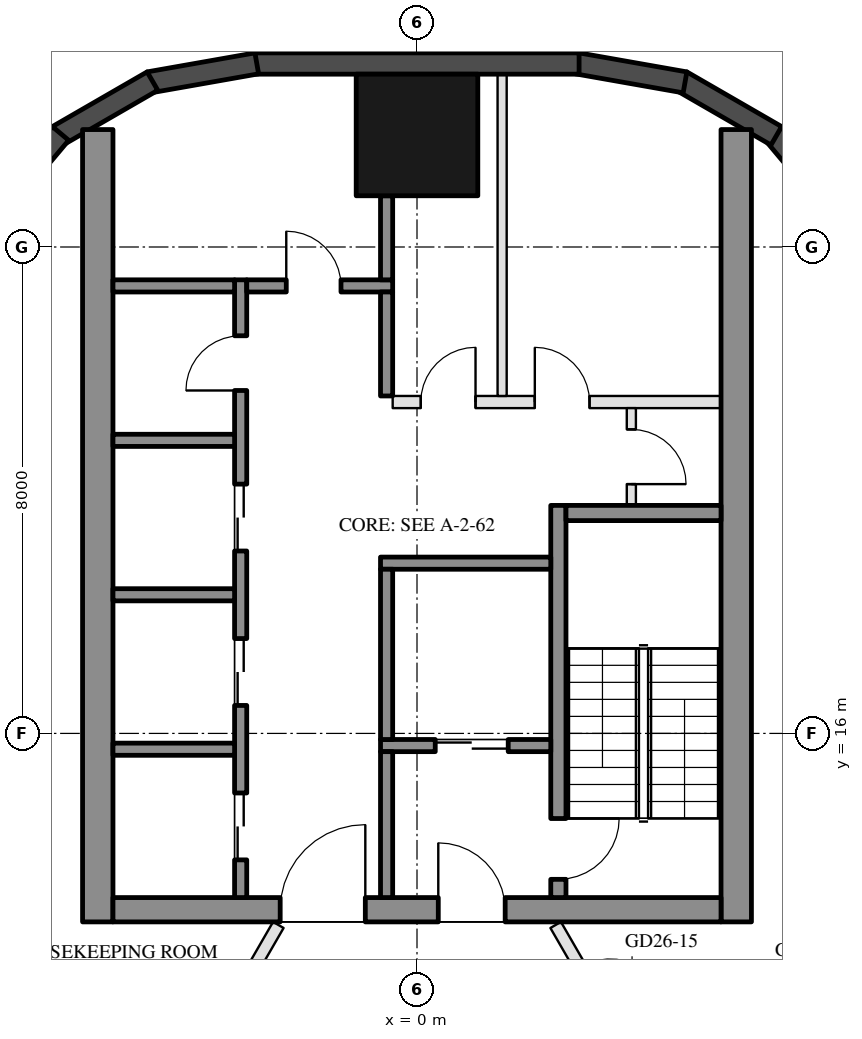
"""IFC4 building model, lengths in metres.
Left out: names, types, materials, properties, quantities, classifications, styles, units other than length and angle.
Written with IfcOpenShell. Run it as: python <this file> out.ifc"""

import sys

from ifc_helpers import new_model, si_unit, direction, frame, frame_2d, origin, origin_2d, place, context, subcontext, project, spatial, rectangle, hollow_rectangle, extrude, boolean, halfspace, element, fill, save


model = new_model("IFC4")
c1 = context("Model", 3, precision=1e-05, world=origin(), true_north=direction((0.0, 1.0)))
c2 = subcontext(c1, "Body", "Model", "MODEL_VIEW")
j1 = project(units=[si_unit("LENGTHUNIT", "METRE"), si_unit("PLANEANGLEUNIT", "RADIAN")], contexts=[c1])
p1 = place(None, origin())
s1 = spatial("IfcSite", under=j1, at=p1, CompositionType="ELEMENT")
p2 = place(p1, origin())
s2 = spatial("IfcBuilding", under=s1, at=p2, CompositionType="ELEMENT")
p3 = place(p2, frame((0.0, 0.0, 268.9)))
s3 = spatial("IfcBuildingStorey", under=s2, at=p3, CompositionType="ELEMENT", Elevation=268.9)
p4 = place(p3, frame((0.0, 25.843, 0.0), z_axis=(0.0, 0.0, 1.0), x_axis=(1.0, 0.0, 0.0)))
e1 = element("IfcColumn", 1, at=p4, inside=s3, PredefinedType="COLUMN", context=c2, shape_type="SweptSolid", body=[
    boolean("DIFFERENCE", extrude(hollow_rectangle(XDim=2.0, YDim=2.0, WallThickness=0.05, at=origin_2d()), origin(), (0.0, 0.0, 1.0), 3.7), halfspace(frame((0.0, 0.0, 0.113), z_axis=(0.0, 0.0, 1.0), x_axis=(1.0, 0.0, 0.0)), True)),
])
p5 = place(p3, frame((7.019, 24.489, 0.0), z_axis=(0.0, 0.0, 1.0), x_axis=(-0.642756114672, 0.766070869471, 0.0)))
e2 = element("IfcWall", 2, at=p5, inside=s3, PredefinedType="SOLIDWALL", context=c2, shape_type="SweptSolid", body=[
    extrude(rectangle(XDim=1.8, YDim=0.35, at=frame_2d((0.9, 0.0))), origin(), (0.0, 0.0, 1.0), 3.55),
])
for number, where, z_axis, x_axis in (
    (3, (5.909, 25.829, 0.0), (0.0, 0.0, 1.0), (-0.866, 0.5, 0.0)),
    (4, (4.408, 26.708, 0.0), (0.0, 0.0, 1.0), (-0.985, 0.174, 0.0)),
):
    element("IfcWall", number, at=place(p3, frame(where, z_axis=z_axis, x_axis=x_axis)), inside=s3, PredefinedType="SOLIDWALL", context=c2, shape_type="SweptSolid", body=[
        extrude(rectangle(XDim=1.8, YDim=0.35, at=frame_2d((0.9, 0.0))), origin(), (0.0, 0.0, 1.0), 3.55),
    ])
p6 = place(p3, frame((2.666, 27.018, 0.0), z_axis=(0.0, 0.0, 1.0), x_axis=(-1.0, 0.0, 0.0)))
e5 = element("IfcWall", 5, at=p6, inside=s3, PredefinedType="SOLIDWALL", context=c2, shape_type="SweptSolid", body=[
    extrude(rectangle(XDim=5.331, YDim=0.35, at=frame_2d((2.666, 0.0))), origin(), (0.0, 0.0, 1.0), 3.55),
])
for number, where, z_axis, x_axis in (
    (6, (-2.635, 27.02, 0.0), (0.0, 0.0, 1.0), (-0.985, -0.174, 0.0)),
    (7, (-4.351, 26.729, 0.0), (0.0, 0.0, 1.0), (-0.866, -0.5, 0.0)),
):
    element("IfcWall", number, at=place(p3, frame(where, z_axis=z_axis, x_axis=x_axis)), inside=s3, PredefinedType="SOLIDWALL", context=c2, shape_type="SweptSolid", body=[
        extrude(rectangle(XDim=1.8, YDim=0.35, at=frame_2d((0.9, 0.0))), origin(), (0.0, 0.0, 1.0), 3.55),
    ])
p7 = place(p3, frame((-5.863, 25.868, 0.0), z_axis=(0.0, 0.0, 1.0), x_axis=(-0.642756114672, -0.766070869471, 0.0)))
e8 = element("IfcWall", 8, at=p7, inside=s3, PredefinedType="SOLIDWALL", context=c2, shape_type="SweptSolid", body=[
    extrude(rectangle(XDim=1.8, YDim=0.35, at=frame_2d((0.9, 0.0))), origin(), (0.0, 0.0, 1.0), 3.55),
])
for number, where, z_axis, x_axis in (
    (9, (5.25, 12.9, 0.0), (0.0, 0.0, 1.0), (0.0, 1.0, 0.0)),
    (10, (-5.25, 12.9, 0.0), (0.0, 0.0, 1.0), (0.0, 1.0, 0.0)),
):
    element("IfcWall", number, at=place(p3, frame(where, z_axis=z_axis, x_axis=x_axis)), inside=s3, PredefinedType="SHEAR", context=c2, shape_type="SweptSolid", body=[
        extrude(rectangle(XDim=13.031, YDim=0.5, at=frame_2d((6.516, 0.0))), origin(), (0.0, 0.0, 1.0), 3.5),
    ])
p8 = place(p3, frame((5.0, 13.1, 0.0), z_axis=(0.0, 0.0, 1.0), x_axis=(-1.0, 0.0, 0.0)))
e11 = element("IfcWall", 11, at=p8, inside=s3, PredefinedType="SHEAR", context=c2, shape_type="SweptSolid", body=[
    extrude(rectangle(XDim=10.0, YDim=0.4, at=frame_2d((5.0, 0.0))), origin(), (0.0, 0.0, 1.0), 3.5),
])
p9 = place(p8, frame((3.55, 0.0, 0.0)))
e12 = element("IfcOpeningElement", 12, at=p9, cuts=e11, PredefinedType="OPENING", context=c2, shape_type="SweptSolid", body=[
    extrude(rectangle(XDim=1.1, YDim=2.1, at=frame_2d((0.55, 1.05))), frame((0.0, 0.21, 0.0), z_axis=(0.0, -1.0, 0.0), x_axis=(1.0, 0.0, 0.0)), (0.0, 0.0, 1.0), 0.42),
])
p10 = place(p8, frame((5.85, 0.0, 0.0)))
e13 = element("IfcOpeningElement", 13, at=p10, cuts=e11, PredefinedType="OPENING", context=c2, shape_type="SweptSolid", body=[
    extrude(rectangle(XDim=1.4, YDim=2.1, at=frame_2d((0.7, 1.05))), frame((0.0, 0.21, 0.0), z_axis=(0.0, -1.0, 0.0), x_axis=(1.0, 0.0, 0.0)), (0.0, 0.0, 1.0), 0.42),
])
p11 = place(p3, frame((2.325, 13.3, 0.0), z_axis=(0.0, 0.0, 1.0), x_axis=(0.0, 1.0, 0.0)))
e14 = element("IfcWall", 14, at=p11, inside=s3, PredefinedType="SHEAR", context=c2, shape_type="SweptSolid", body=[
    extrude(rectangle(XDim=6.45, YDim=0.25, at=frame_2d((3.225, 0.0))), origin(), (0.0, 0.0, 1.0), 3.5),
])
p12 = place(p11, frame((0.3, 0.0, 0.0)))
e15 = element("IfcOpeningElement", 15, at=p12, cuts=e14, PredefinedType="OPENING", context=c2, shape_type="SweptSolid", body=[
    extrude(rectangle(XDim=1.0, YDim=2.1, at=frame_2d((0.5, 1.05))), frame((0.0, 0.135, 0.0), z_axis=(0.0, -1.0, 0.0), x_axis=(1.0, 0.0, 0.0)), (0.0, 0.0, 1.0), 0.27),
])
p13 = place(p3, frame((5.0, 19.625, 0.0), z_axis=(0.0, 0.0, 1.0), x_axis=(-1.0, 0.0, 0.0)))
e16 = element("IfcWall", 16, at=p13, inside=s3, PredefinedType="SHEAR", context=c2, shape_type="SweptSolid", body=[
    extrude(rectangle(XDim=2.55, YDim=0.25, at=frame_2d((1.275, 0.0))), origin(), (0.0, 0.0, 1.0), 3.5),
])
p14 = place(p3, frame((2.2, 18.8, 0.0), z_axis=(0.0, 0.0, 1.0), x_axis=(-1.0, 0.0, 0.0)))
e17 = element("IfcWall", 17, at=p14, inside=s3, PredefinedType="SHEAR", context=c2, shape_type="SweptSolid", body=[
    extrude(rectangle(XDim=2.8, YDim=0.2, at=frame_2d((1.4, 0.0))), origin(), (0.0, 0.0, 1.0), 3.5),
])
p15 = place(p3, frame((2.2, 15.8, 0.0), z_axis=(0.0, 0.0, 1.0), x_axis=(-1.0, 0.0, 0.0)))
e18 = element("IfcWall", 18, at=p15, inside=s3, PredefinedType="SHEAR", context=c2, shape_type="SweptSolid", body=[
    extrude(rectangle(XDim=2.8, YDim=0.2, at=frame_2d((1.4, 0.0))), origin(), (0.0, 0.0, 1.0), 3.5),
])
p16 = place(p15, frame((0.7, 0.0, 0.0)))
e19 = element("IfcOpeningElement", 19, at=p16, cuts=e18, PredefinedType="OPENING", context=c2, shape_type="SweptSolid", body=[
    extrude(rectangle(XDim=1.2, YDim=2.1, at=frame_2d((0.6, 1.05))), frame((0.0, 0.11, 0.0), z_axis=(0.0, -1.0, 0.0), x_axis=(1.0, 0.0, 0.0)), (0.0, 0.0, 1.0), 0.22),
])
p17 = place(p3, frame((-0.5, 15.9, 0.0), z_axis=(0.0, 0.0, 1.0), x_axis=(0.0, 1.0, 0.0)))
e20 = element("IfcWall", 20, at=p17, inside=s3, PredefinedType="SHEAR", context=c2, shape_type="SweptSolid", body=[
    extrude(rectangle(XDim=2.8, YDim=0.2, at=frame_2d((1.4, 0.0))), origin(), (0.0, 0.0, 1.0), 3.5),
])
p18 = place(p3, frame((-0.5, 13.3, 0.0), z_axis=(0.0, 0.0, 1.0), x_axis=(0.0, 1.0, 0.0)))
e21 = element("IfcWall", 21, at=p18, inside=s3, PredefinedType="SHEAR", context=c2, shape_type="SweptSolid", body=[
    extrude(rectangle(XDim=2.4, YDim=0.2, at=frame_2d((1.2, 0.0))), origin(), (0.0, 0.0, 1.0), 3.5),
])
p19 = place(p3, frame((-2.9, 13.3, 0.0), z_axis=(0.0, 0.0, 1.0), x_axis=(0.0, 1.0, 0.0)))
e22 = element("IfcWall", 22, at=p19, inside=s3, PredefinedType="SHEAR", context=c2, shape_type="SweptSolid", body=[
    extrude(rectangle(XDim=10.16, YDim=0.2, at=frame_2d((5.08, 0.0))), origin(), (0.0, 0.0, 1.0), 3.5),
])
p20 = place(p19, frame((0.62, 0.0, 0.0)))
e23 = element("IfcOpeningElement", 23, at=p20, cuts=e22, PredefinedType="OPENING", context=c2, shape_type="SweptSolid", body=[
    extrude(rectangle(XDim=1.1, YDim=2.1, at=frame_2d((0.55, 1.05))), frame((0.0, 0.11, 0.0), z_axis=(0.0, -1.0, 0.0), x_axis=(1.0, 0.0, 0.0)), (0.0, 0.0, 1.0), 0.22),
])
p21 = place(p19, frame((3.16, 0.0, 0.0)))
e24 = element("IfcOpeningElement", 24, at=p21, cuts=e22, PredefinedType="OPENING", context=c2, shape_type="SweptSolid", body=[
    extrude(rectangle(XDim=1.1, YDim=2.1, at=frame_2d((0.55, 1.05))), frame((0.0, 0.11, 0.0), z_axis=(0.0, -1.0, 0.0), x_axis=(1.0, 0.0, 0.0)), (0.0, 0.0, 1.0), 0.22),
])
p22 = place(p19, frame((5.7, 0.0, 0.0)))
e25 = element("IfcOpeningElement", 25, at=p22, cuts=e22, PredefinedType="OPENING", context=c2, shape_type="SweptSolid", body=[
    extrude(rectangle(XDim=1.1, YDim=2.1, at=frame_2d((0.55, 1.05))), frame((0.0, 0.11, 0.0), z_axis=(0.0, -1.0, 0.0), x_axis=(1.0, 0.0, 0.0)), (0.0, 0.0, 1.0), 0.22),
])
p23 = place(p19, frame((8.34, 0.0, 0.0)))
e26 = element("IfcOpeningElement", 26, at=p23, cuts=e22, PredefinedType="OPENING", context=c2, shape_type="SweptSolid", body=[
    extrude(rectangle(XDim=0.9, YDim=2.1, at=frame_2d((0.45, 1.05))), frame((0.0, 0.11, 0.0), z_axis=(0.0, -1.0, 0.0), x_axis=(1.0, 0.0, 0.0)), (0.0, 0.0, 1.0), 0.22),
])
p24 = place(p3, frame((-0.4, 23.36, 0.0), z_axis=(0.0, 0.0, 1.0), x_axis=(-1.0, 0.0, 0.0)))
e27 = element("IfcWall", 27, at=p24, inside=s3, PredefinedType="SHEAR", context=c2, shape_type="SweptSolid", body=[
    extrude(rectangle(XDim=2.4, YDim=0.2, at=frame_2d((1.2, 0.0))), origin(), (0.0, 0.0, 1.0), 3.5),
])
p25 = place(p24, frame((0.85, 0.0, 0.0)))
e28 = element("IfcOpeningElement", 28, at=p25, cuts=e27, PredefinedType="OPENING", context=c2, shape_type="SweptSolid", body=[
    extrude(rectangle(XDim=0.9, YDim=2.1, at=frame_2d((0.45, 1.05))), frame((0.0, 0.11, 0.0), z_axis=(0.0, -1.0, 0.0), x_axis=(1.0, 0.0, 0.0)), (0.0, 0.0, 1.0), 0.22),
])
p26 = place(p3, frame((-0.5, 21.55, 0.0), z_axis=(0.0, 0.0, 1.0), x_axis=(0.0, 1.0, 0.0)))
e29 = element("IfcWall", 29, at=p26, inside=s3, PredefinedType="SHEAR", context=c2, shape_type="SweptSolid", body=[
    extrude(rectangle(XDim=1.71, YDim=0.2, at=frame_2d((0.855, 0.0))), origin(), (0.0, 0.0, 1.0), 3.5),
])
for number, where, z_axis, x_axis in (
    (30, (-3.0, 15.74, 0.0), (0.0, 0.0, 1.0), (-1.0, 0.0, 0.0)),
    (31, (-3.0, 18.28, 0.0), (0.0, 0.0, 1.0), (-1.0, 0.0, 0.0)),
    (32, (-3.0, 20.82, 0.0), (0.0, 0.0, 1.0), (-1.0, 0.0, 0.0)),
    (33, (-3.0, 23.36, 0.0), (0.0, 0.0, 1.0), (-1.0, 0.0, 0.0)),
):
    element("IfcWall", number, at=place(p3, frame(where, z_axis=z_axis, x_axis=x_axis)), inside=s3, PredefinedType="SHEAR", context=c2, shape_type="SweptSolid", body=[
        extrude(rectangle(XDim=2.0, YDim=0.2, at=frame_2d((1.0, 0.0))), origin(), (0.0, 0.0, 1.0), 3.5),
    ])
p27 = place(p3, frame((-0.5, 23.46, 0.0), z_axis=(0.0, 0.0, 1.0), x_axis=(0.0, 1.0, 0.0)))
e34 = element("IfcWall", 34, at=p27, inside=s3, PredefinedType="SHEAR", context=c2, shape_type="SweptSolid", body=[
    extrude(rectangle(XDim=1.383, YDim=0.2, at=frame_2d((0.691, 0.0))), origin(), (0.0, 0.0, 1.0), 3.5),
])
p28 = place(p3, frame((5.0, 21.45, 0.0), z_axis=(0.0, 0.0, 1.0), x_axis=(-1.0, 0.0, 0.0)))
e35 = element("IfcWall", 35, at=p28, inside=s3, PredefinedType="PARTITIONING", context=c2, shape_type="SweptSolid", body=[
    extrude(rectangle(XDim=5.4, YDim=0.2, at=frame_2d((2.7, 0.0))), origin(), (0.0, 0.0, 1.0), 3.5),
])
p29 = place(p28, frame((2.163, 0.0, 0.0)))
e36 = element("IfcOpeningElement", 36, at=p29, cuts=e35, PredefinedType="OPENING", context=c2, shape_type="SweptSolid", body=[
    extrude(rectangle(XDim=0.9, YDim=2.1, at=frame_2d((0.45, 1.05))), frame((0.0, 0.11, 0.0), z_axis=(0.0, -1.0, 0.0), x_axis=(1.0, 0.0, 0.0)), (0.0, 0.0, 1.0), 0.22),
])
p30 = place(p28, frame((4.038, 0.0, 0.0)))
e37 = element("IfcOpeningElement", 37, at=p30, cuts=e35, PredefinedType="OPENING", context=c2, shape_type="SweptSolid", body=[
    extrude(rectangle(XDim=0.9, YDim=2.1, at=frame_2d((0.45, 1.05))), frame((0.0, 0.11, 0.0), z_axis=(0.0, -1.0, 0.0), x_axis=(1.0, 0.0, 0.0)), (0.0, 0.0, 1.0), 0.22),
])
p31 = place(p3, frame((3.525, 19.75, 0.0), z_axis=(0.0, 0.0, 1.0), x_axis=(0.0, 1.0, 0.0)))
e38 = element("IfcWall", 38, at=p31, inside=s3, PredefinedType="PARTITIONING", context=c2, shape_type="SweptSolid", body=[
    extrude(rectangle(XDim=1.6, YDim=0.15, at=frame_2d((0.8, 0.0))), origin(), (0.0, 0.0, 1.0), 3.5),
])
p32 = place(p31, frame((0.35, 0.0, 0.0)))
e39 = element("IfcOpeningElement", 39, at=p32, cuts=e38, PredefinedType="OPENING", context=c2, shape_type="SweptSolid", body=[
    extrude(rectangle(XDim=0.9, YDim=2.1, at=frame_2d((0.45, 1.05))), frame((0.0, 0.085, 0.0), z_axis=(0.0, -1.0, 0.0), x_axis=(1.0, 0.0, 0.0)), (0.0, 0.0, 1.0), 0.17),
])
p33 = place(p3, frame((1.4, 21.55, 0.0), z_axis=(0.0, 0.0, 1.0), x_axis=(0.0, 1.0, 0.0)))
e40 = element("IfcWall", 40, at=p33, inside=s3, PredefinedType="PARTITIONING", context=c2, shape_type="SweptSolid", body=[
    extrude(rectangle(XDim=5.292, YDim=0.15, at=frame_2d((2.646, 0.0))), origin(), (0.0, 0.0, 1.0), 3.5),
])
p34 = place(p3, frame((12.715, 14.269, 0.0), z_axis=(0.0, 0.0, 1.0), x_axis=(-0.866024954444, -0.500000778279, 0.0)))
e41 = element("IfcWall", 41, at=p34, inside=s3, PredefinedType="PARTITIONING", context=c2, shape_type="SweptSolid", body=[
    extrude(rectangle(XDim=9.846, YDim=0.2, at=frame_2d((4.923, 0.0))), origin(), (0.0, 0.0, 1.0), 3.16),
])
p35 = place(p3, frame((13.726, 12.518, 0.0), z_axis=(0.0, 0.0, 1.0), x_axis=(-0.859340362174, -0.511404088699, 0.0)))
e42 = element("IfcWall", 42, at=p35, inside=s3, PredefinedType="PARTITIONING", context=c2, shape_type="SweptSolid", body=[
    extrude(rectangle(XDim=9.847, YDim=0.15, at=frame_2d((4.923, 0.0))), origin(), (0.0, 0.0, 1.0), 3.0),
])
p36 = place(p3, frame((2.281, 12.85, 0.0), z_axis=(0.0, 0.0, 1.0), x_axis=(0.500008716408, -0.866020371305, 0.0)))
e43 = element("IfcWall", 43, at=p36, inside=s3, PredefinedType="PARTITIONING", context=c2, shape_type="SweptSolid", body=[
    extrude(rectangle(XDim=3.888, YDim=0.2, at=frame_2d((1.944, 0.0))), origin(), (0.0, 0.0, 1.0), 3.0),
])
p37 = place(p36, frame((0.8, 0.0, 0.0)))
e44 = element("IfcOpeningElement", 44, at=p37, cuts=e43, PredefinedType="OPENING", context=c2, shape_type="SweptSolid", body=[
    extrude(rectangle(XDim=1.0, YDim=2.1, at=frame_2d((0.5, 1.05))), frame((0.0, 0.11, 0.0), z_axis=(0.0, -1.0, 0.0), x_axis=(1.0, 0.0, 0.0)), (0.0, 0.0, 1.0), 0.22),
])
p38 = place(p3, frame((-4.97, 8.191, 0.0), z_axis=(0.0, 0.0, 1.0), x_axis=(0.499994808408, 0.866028401131, 0.0)))
e45 = element("IfcWall", 45, at=p38, inside=s3, PredefinedType="PARTITIONING", context=c2, shape_type="SweptSolid", body=[
    extrude(rectangle(XDim=5.38, YDim=0.2, at=frame_2d((2.69, 0.0))), origin(), (0.0, 0.0, 1.0), 3.0),
])
p39 = place(p38, frame((2.19, 0.0, 0.0)))
e46 = element("IfcOpeningElement", 46, at=p39, cuts=e45, PredefinedType="OPENING", context=c2, shape_type="SweptSolid", body=[
    extrude(rectangle(XDim=1.0, YDim=2.1, at=frame_2d((0.5, 1.05))), frame((0.0, 0.11, 0.0), z_axis=(0.0, -1.0, 0.0), x_axis=(1.0, 0.0, 0.0)), (0.0, 0.0, 1.0), 0.22),
])
p40 = place(p16, origin())
e47 = element("IfcDoor", 47, at=p40, inside=s3, OperationType="DOUBLE_DOOR_SLIDING", PredefinedType="DOOR", context=c2, shape_type="SweptSolid", body=[
    extrude(rectangle(XDim=1.2, YDim=2.1, at=frame_2d((0.6, 1.05))), frame((0.0, 0.025, 0.0), z_axis=(0.0, -1.0, 0.0), x_axis=(1.0, 0.0, 0.0)), (0.0, 0.0, 1.0), 0.05),
])
fill(e19, e47)
p41 = place(p32, frame((0.9, 0.0, 0.0), z_axis=(0.0, 0.0, 1.0), x_axis=(-1.0, 0.0, 0.0)))
e48 = element("IfcDoor", 48, at=p41, inside=s3, OperationType="SINGLE_SWING_RIGHT", PredefinedType="DOOR", context=c2, shape_type="SweptSolid", body=[
    extrude(rectangle(XDim=0.9, YDim=2.1, at=frame_2d((0.45, 1.05))), frame((0.0, 0.025, 0.0), z_axis=(0.0, -1.0, 0.0), x_axis=(1.0, 0.0, 0.0)), (0.0, 0.0, 1.0), 0.05),
])
fill(e39, e48)
p42 = place(p20, origin())
e49 = element("IfcDoor", 49, at=p42, inside=s3, OperationType="DOUBLE_DOOR_SLIDING", PredefinedType="DOOR", context=c2, shape_type="SweptSolid", body=[
    extrude(rectangle(XDim=1.1, YDim=2.1, at=frame_2d((0.55, 1.05))), frame((0.0, 0.025, 0.0), z_axis=(0.0, -1.0, 0.0), x_axis=(1.0, 0.0, 0.0)), (0.0, 0.0, 1.0), 0.05),
])
fill(e23, e49)
p43 = place(p21, origin())
e50 = element("IfcDoor", 50, at=p43, inside=s3, OperationType="DOUBLE_DOOR_SLIDING", PredefinedType="DOOR", context=c2, shape_type="SweptSolid", body=[
    extrude(rectangle(XDim=1.1, YDim=2.1, at=frame_2d((0.55, 1.05))), frame((0.0, 0.025, 0.0), z_axis=(0.0, -1.0, 0.0), x_axis=(1.0, 0.0, 0.0)), (0.0, 0.0, 1.0), 0.05),
])
fill(e24, e50)
p44 = place(p22, origin())
e51 = element("IfcDoor", 51, at=p44, inside=s3, OperationType="DOUBLE_DOOR_SLIDING", PredefinedType="DOOR", context=c2, shape_type="SweptSolid", body=[
    extrude(rectangle(XDim=1.1, YDim=2.1, at=frame_2d((0.55, 1.05))), frame((0.0, 0.025, 0.0), z_axis=(0.0, -1.0, 0.0), x_axis=(1.0, 0.0, 0.0)), (0.0, 0.0, 1.0), 0.05),
])
fill(e25, e51)
p45 = place(p23, origin())
e52 = element("IfcDoor", 52, at=p45, inside=s3, OperationType="SINGLE_SWING_LEFT", PredefinedType="DOOR", context=c2, shape_type="SweptSolid", body=[
    extrude(rectangle(XDim=0.9, YDim=2.1, at=frame_2d((0.45, 1.05))), frame((0.0, 0.025, 0.0), z_axis=(0.0, -1.0, 0.0), x_axis=(1.0, 0.0, 0.0)), (0.0, 0.0, 1.0), 0.05),
])
fill(e26, e52)
p46 = place(p25, frame((0.9, 0.0, 0.0), z_axis=(0.0, 0.0, 1.0), x_axis=(-1.0, 0.0, 0.0)))
e53 = element("IfcDoor", 53, at=p46, inside=s3, OperationType="SINGLE_SWING_LEFT", PredefinedType="DOOR", context=c2, shape_type="SweptSolid", body=[
    extrude(rectangle(XDim=0.9, YDim=2.1, at=frame_2d((0.45, 1.05))), frame((0.0, 0.025, 0.0), z_axis=(0.0, -1.0, 0.0), x_axis=(1.0, 0.0, 0.0)), (0.0, 0.0, 1.0), 0.05),
])
fill(e28, e53)
p47 = place(p29, frame((0.9, 0.0, 0.0), z_axis=(0.0, 0.0, 1.0), x_axis=(-1.0, 0.0, 0.0)))
e54 = element("IfcDoor", 54, at=p47, inside=s3, OperationType="SINGLE_SWING_LEFT", PredefinedType="DOOR", context=c2, shape_type="SweptSolid", body=[
    extrude(rectangle(XDim=0.9, YDim=2.1, at=frame_2d((0.45, 1.05))), frame((0.0, 0.025, 0.0), z_axis=(0.0, -1.0, 0.0), x_axis=(1.0, 0.0, 0.0)), (0.0, 0.0, 1.0), 0.05),
])
fill(e36, e54)
p48 = place(p30, frame((0.9, 0.0, 0.0), z_axis=(0.0, 0.0, 1.0), x_axis=(-1.0, 0.0, 0.0)))
e55 = element("IfcDoor", 55, at=p48, inside=s3, OperationType="SINGLE_SWING_RIGHT", PredefinedType="DOOR", context=c2, shape_type="SweptSolid", body=[
    extrude(rectangle(XDim=0.9, YDim=2.1, at=frame_2d((0.45, 1.05))), frame((0.0, 0.025, 0.0), z_axis=(0.0, -1.0, 0.0), x_axis=(1.0, 0.0, 0.0)), (0.0, 0.0, 1.0), 0.05),
])
fill(e37, e55)
p49 = place(p9, frame((1.1, 0.0, 0.0), z_axis=(0.0, 0.0, 1.0), x_axis=(-1.0, 0.0, 0.0)))
e56 = element("IfcDoor", 56, at=p49, inside=s3, OperationType="SINGLE_SWING_LEFT", PredefinedType="DOOR", context=c2, shape_type="SweptSolid", body=[
    extrude(rectangle(XDim=1.1, YDim=2.1, at=frame_2d((0.55, 1.05))), frame((0.0, 0.025, 0.0), z_axis=(0.0, -1.0, 0.0), x_axis=(1.0, 0.0, 0.0)), (0.0, 0.0, 1.0), 0.05),
])
fill(e12, e56)
p50 = place(p10, frame((1.4, 0.0, 0.0), z_axis=(0.0, 0.0, 1.0), x_axis=(-1.0, 0.0, 0.0)))
e57 = element("IfcDoor", 57, at=p50, inside=s3, OperationType="DOUBLE_DOOR_SINGLE_SWING", PredefinedType="DOOR", context=c2, shape_type="SweptSolid", body=[
    extrude(rectangle(XDim=1.4, YDim=2.1, at=frame_2d((0.7, 1.05))), frame((0.0, 0.025, 0.0), z_axis=(0.0, -1.0, 0.0), x_axis=(1.0, 0.0, 0.0)), (0.0, 0.0, 1.0), 0.05),
])
fill(e13, e57)
p51 = place(p12, frame((1.0, 0.0, 0.0), z_axis=(0.0, 0.0, 1.0), x_axis=(-1.0, 0.0, 0.0)))
e58 = element("IfcDoor", 58, at=p51, inside=s3, OperationType="SINGLE_SWING_LEFT", PredefinedType="DOOR", context=c2, shape_type="SweptSolid", body=[
    extrude(rectangle(XDim=1.0, YDim=2.1, at=frame_2d((0.5, 1.05))), frame((0.0, 0.025, 0.0), z_axis=(0.0, -1.0, 0.0), x_axis=(1.0, 0.0, 0.0)), (0.0, 0.0, 1.0), 0.05),
])
fill(e15, e58)
save(model, sys.argv[1])
